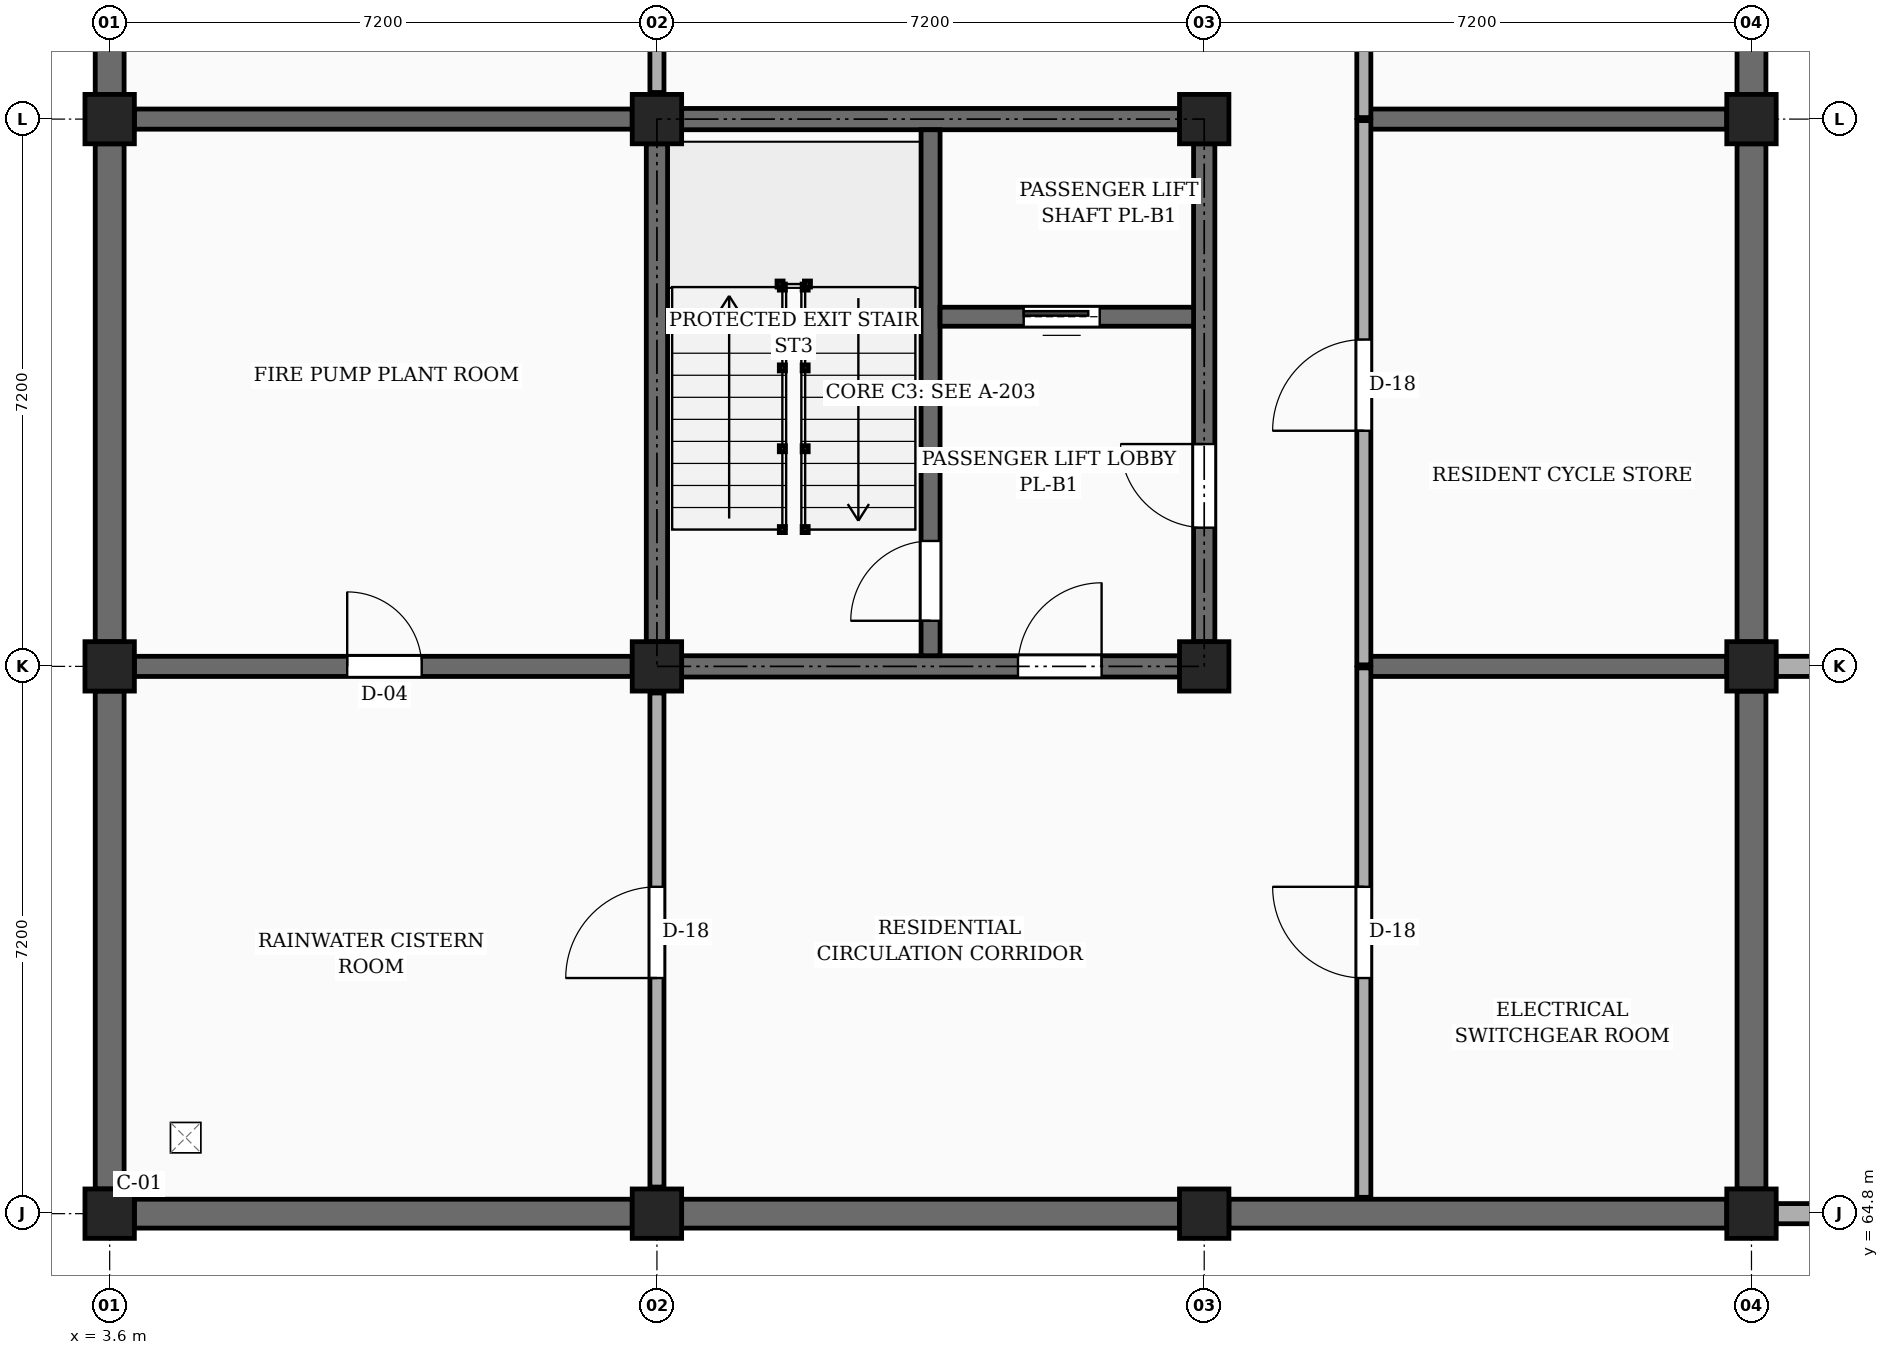
"""IFC4 building model, lengths in metres.
Left out: names, types, materials, properties, quantities, classifications, styles, units other than length and angle.
Written with IfcOpenShell. Run it as: python <this file> out.ifc"""

import sys

from ifc_helpers import new_model, si_unit, direction, frame, frame_2d, origin, origin_2d, place, context, subcontext, project, spatial, rectangle, extrude, element, fill, save


model = new_model("IFC4")
c1 = context("Model", 3, precision=1e-05, world=origin(), true_north=direction((0.0, 1.0)))
c2 = subcontext(c1, "Body", "Model", "MODEL_VIEW")
j1 = project(units=[si_unit("LENGTHUNIT", "METRE"), si_unit("PLANEANGLEUNIT", "RADIAN")], contexts=[c1])
p1 = place(None, origin())
s1 = spatial("IfcSite", under=j1, at=p1, CompositionType="ELEMENT")
p2 = place(p1, origin())
s2 = spatial("IfcBuilding", under=s1, at=p2, CompositionType="ELEMENT")
p3 = place(p2, frame((0.0, 0.0, -4.2)))
s3 = spatial("IfcBuildingStorey", under=s2, at=p3, CompositionType="ELEMENT", Elevation=-4.2)
p4 = place(p3, frame((25.525, 64.8, 0.0), z_axis=(0.0, 0.0, 1.0), x_axis=(1.0, 0.0, 0.0)))
e1 = element("IfcWall", 1, at=p4, inside=s3, PredefinedType="SOLIDWALL", context=c2, shape_type="SweptSolid", body=[
    extrude(rectangle(XDim=1.865, YDim=0.265, at=frame_2d((0.933, 0.0))), origin(), (0.0, 0.0, 1.0), 4.12),
])
p5 = place(p3, frame((27.39, 72.0, 0.0), z_axis=(0.0, 0.0, 1.0), x_axis=(-1.0, 0.0, 0.0)))
e2 = element("IfcWall", 2, at=p5, inside=s3, PredefinedType="SOLIDWALL", context=c2, shape_type="SweptSolid", body=[
    extrude(rectangle(XDim=1.865, YDim=0.265, at=frame_2d((0.933, 0.0))), origin(), (0.0, 0.0, 1.0), 3.35),
])
for number, where, z_axis, x_axis in (
    (3, (3.6, 64.8, 0.0), (0.0, 0.0, 1.0), (1.0, 0.0, 0.0)),
    (4, (3.6, 72.0, 0.0), (0.0, 0.0, 1.0), (1.0, 0.0, 0.0)),
    (5, (3.6, 79.2, 0.0), (0.0, 0.0, 1.0), (1.0, 0.0, 0.0)),
    (6, (10.8, 64.8, 0.0), (0.0, 0.0, 1.0), (1.0, 0.0, 0.0)),
    (7, (10.8, 72.0, 0.0), (0.0, 0.0, 1.0), (1.0, 0.0, 0.0)),
    (8, (10.8, 79.2, 0.0), (0.0, 0.0, 1.0), (1.0, 0.0, 0.0)),
    (9, (18.0, 64.8, 0.0), (0.0, 0.0, 1.0), (1.0, 0.0, 0.0)),
    (10, (18.0, 72.0, 0.0), (0.0, 0.0, 1.0), (1.0, 0.0, 0.0)),
    (11, (18.0, 79.2, 0.0), (0.0, 0.0, 1.0), (1.0, 0.0, 0.0)),
    (12, (25.2, 64.8, 0.0), (0.0, 0.0, 1.0), (1.0, 0.0, 0.0)),
    (13, (25.2, 72.0, 0.0), (0.0, 0.0, 1.0), (1.0, 0.0, 0.0)),
    (14, (25.2, 79.2, 0.0), (0.0, 0.0, 1.0), (1.0, 0.0, 0.0)),
):
    element("IfcColumn", number, at=place(p3, frame(where, z_axis=z_axis, x_axis=x_axis)), inside=s3, PredefinedType="COLUMN", context=c2, shape_type="SweptSolid", body=[
        extrude(rectangle(XDim=0.65, YDim=0.65, at=origin_2d()), origin(), (0.0, 0.0, 1.0), 4.2),
    ])
for number, where, z_axis, x_axis in (
    (15, (3.925, 64.8, 0.0), (0.0, 0.0, 1.0), (1.0, 0.0, 0.0)),
    (16, (11.125, 64.8, 0.0), (0.0, 0.0, 1.0), (1.0, 0.0, 0.0)),
    (17, (18.325, 64.8, 0.0), (0.0, 0.0, 1.0), (1.0, 0.0, 0.0)),
    (18, (25.2, 65.125, 0.0), (0.0, 0.0, 1.0), (0.0, 1.0, 0.0)),
    (19, (3.6, 71.675, 0.0), (0.0, 0.0, 1.0), (0.0, -1.0, 0.0)),
    (20, (25.2, 72.325, 0.0), (0.0, 0.0, 1.0), (0.0, 1.0, 0.0)),
    (21, (3.6, 78.875, 0.0), (0.0, 0.0, 1.0), (0.0, -1.0, 0.0)),
    (22, (25.2, 79.525, 0.0), (0.0, 0.0, 1.0), (0.0, 1.0, 0.0)),
    (23, (3.6, 86.075, 0.0), (0.0, 0.0, 1.0), (0.0, -1.0, 0.0)),
):
    element("IfcWall", number, at=place(p3, frame(where, z_axis=z_axis, x_axis=x_axis)), inside=s3, PredefinedType="USERDEFINED", context=c2, shape_type="SweptSolid", body=[
        extrude(rectangle(XDim=6.55, YDim=0.38, at=frame_2d((3.275, 0.0))), origin(), (0.0, 0.0, 1.0), 3.03),
    ])
p6 = place(p3, frame((3.925, 72.0, 0.0), z_axis=(0.0, 0.0, 1.0), x_axis=(1.0, 0.0, 0.0)))
e24 = element("IfcWall", 24, at=p6, inside=s3, PredefinedType="SOLIDWALL", context=c2, shape_type="SweptSolid", body=[
    extrude(rectangle(XDim=6.55, YDim=0.265, at=frame_2d((3.275, 0.0))), origin(), (0.0, 0.0, 1.0), 3.18),
])
p7 = place(p6, frame((2.8, 0.0, 0.0)))
e25 = element("IfcOpeningElement", 25, at=p7, cuts=e24, PredefinedType="OPENING", context=c2, shape_type="SweptSolid", body=[
    extrude(rectangle(XDim=0.98, YDim=2.12, at=frame_2d((0.49, 1.06))), frame((0.0, 0.143, 0.0), z_axis=(0.0, -1.0, 0.0), x_axis=(1.0, 0.0, 0.0)), (0.0, 0.0, 1.0), 0.285),
])
p8 = place(p3, frame((20.1, 72.0, 0.0), z_axis=(0.0, 0.0, 1.0), x_axis=(1.0, 0.0, 0.0)))
e26 = element("IfcWall", 26, at=p8, inside=s3, PredefinedType="SOLIDWALL", context=c2, shape_type="SweptSolid", body=[
    extrude(rectangle(XDim=4.775, YDim=0.265, at=frame_2d((2.387, 0.0))), origin(), (0.0, 0.0, 1.0), 3.18),
])
p9 = place(p3, frame((3.925, 79.2, 0.0), z_axis=(0.0, 0.0, 1.0), x_axis=(1.0, 0.0, 0.0)))
e27 = element("IfcWall", 27, at=p9, inside=s3, PredefinedType="SOLIDWALL", context=c2, shape_type="SweptSolid", body=[
    extrude(rectangle(XDim=6.55, YDim=0.265, at=frame_2d((3.275, 0.0))), origin(), (0.0, 0.0, 1.0), 3.18),
])
p10 = place(p3, frame((20.1, 79.2, 0.0), z_axis=(0.0, 0.0, 1.0), x_axis=(1.0, 0.0, 0.0)))
e28 = element("IfcWall", 28, at=p10, inside=s3, PredefinedType="SOLIDWALL", context=c2, shape_type="SweptSolid", body=[
    extrude(rectangle(XDim=4.775, YDim=0.265, at=frame_2d((2.387, 0.0))), origin(), (0.0, 0.0, 1.0), 3.18),
])
for number, where, z_axis, x_axis in (
    (29, (10.8, 72.325, 0.0), (0.0, 0.0, 1.0), (0.0, 1.0, 0.0)),
    (30, (11.125, 79.2, 0.0), (0.0, 0.0, 1.0), (1.0, 0.0, 0.0)),
):
    element("IfcWall", number, at=place(p3, frame(where, z_axis=z_axis, x_axis=x_axis)), inside=s3, PredefinedType="SHEAR", context=c2, shape_type="SweptSolid", body=[
        extrude(rectangle(XDim=6.55, YDim=0.28, at=frame_2d((3.275, 0.0))), origin(), (0.0, 0.0, 1.0), 3.88),
    ])
p11 = place(p3, frame((18.0, 72.325, 0.0), z_axis=(0.0, 0.0, 1.0), x_axis=(0.0, 1.0, 0.0)))
e31 = element("IfcWall", 31, at=p11, inside=s3, PredefinedType="SHEAR", context=c2, shape_type="SweptSolid", body=[
    extrude(rectangle(XDim=6.55, YDim=0.28, at=frame_2d((3.275, 0.0))), origin(), (0.0, 0.0, 1.0), 3.88),
])
p12 = place(p11, frame((1.5, 0.0, 0.0)))
e32 = element("IfcOpeningElement", 32, at=p12, cuts=e31, PredefinedType="OPENING", context=c2, shape_type="SweptSolid", body=[
    extrude(rectangle(XDim=1.1, YDim=2.15, at=frame_2d((0.55, 1.075))), frame((0.0, 0.15, 0.0), z_axis=(0.0, -1.0, 0.0), x_axis=(1.0, 0.0, 0.0)), (0.0, 0.0, 1.0), 0.3),
])
p13 = place(p3, frame((11.125, 72.0, 0.0), z_axis=(0.0, 0.0, 1.0), x_axis=(1.0, 0.0, 0.0)))
e33 = element("IfcWall", 33, at=p13, inside=s3, PredefinedType="SHEAR", context=c2, shape_type="SweptSolid", body=[
    extrude(rectangle(XDim=6.55, YDim=0.28, at=frame_2d((3.275, 0.0))), origin(), (0.0, 0.0, 1.0), 3.88),
])
p14 = place(p13, frame((4.425, 0.0, 0.0)))
e34 = element("IfcOpeningElement", 34, at=p14, cuts=e33, PredefinedType="OPENING", context=c2, shape_type="SweptSolid", body=[
    extrude(rectangle(XDim=1.1, YDim=2.15, at=frame_2d((0.55, 1.075))), frame((0.0, 0.15, 0.0), z_axis=(0.0, -1.0, 0.0), x_axis=(1.0, 0.0, 0.0)), (0.0, 0.0, 1.0), 0.3),
])
p15 = place(p3, frame((14.4, 72.14, 0.0), z_axis=(0.0, 0.0, 1.0), x_axis=(0.0, 1.0, 0.0)))
e35 = element("IfcWall", 35, at=p15, inside=s3, PredefinedType="SHEAR", context=c2, shape_type="SweptSolid", body=[
    extrude(rectangle(XDim=6.92, YDim=0.25, at=frame_2d((3.46, 0.0))), origin(), (0.0, 0.0, 1.0), 3.88),
])
p16 = place(p15, frame((0.46, 0.0, 0.0)))
e36 = element("IfcOpeningElement", 36, at=p16, cuts=e35, PredefinedType="OPENING", context=c2, shape_type="SweptSolid", body=[
    extrude(rectangle(XDim=1.05, YDim=2.15, at=frame_2d((0.525, 1.075))), frame((0.0, 0.135, 0.0), z_axis=(0.0, -1.0, 0.0), x_axis=(1.0, 0.0, 0.0)), (0.0, 0.0, 1.0), 0.27),
])
p17 = place(p3, frame((14.525, 76.6, 0.0), z_axis=(0.0, 0.0, 1.0), x_axis=(1.0, 0.0, 0.0)))
e37 = element("IfcWall", 37, at=p17, inside=s3, PredefinedType="SHEAR", context=c2, shape_type="SweptSolid", body=[
    extrude(rectangle(XDim=3.335, YDim=0.25, at=frame_2d((1.667, 0.0))), origin(), (0.0, 0.0, 1.0), 3.88),
])
p18 = place(p17, frame((1.1, 0.0, 0.0)))
e38 = element("IfcOpeningElement", 38, at=p18, cuts=e37, PredefinedType="OPENING", context=c2, shape_type="SweptSolid", body=[
    extrude(rectangle(XDim=1.0, YDim=2.2, at=frame_2d((0.5, 1.1))), frame((0.0, 0.135, 0.0), z_axis=(0.0, -1.0, 0.0), x_axis=(1.0, 0.0, 0.0)), (0.0, 0.0, 1.0), 0.27),
])
p19 = place(p3, frame((20.1, 65.015, 0.0), z_axis=(0.0, 0.0, 1.0), x_axis=(0.0, 1.0, 0.0)))
e39 = element("IfcWall", 39, at=p19, inside=s3, PredefinedType="PARTITIONING", context=c2, shape_type="SweptSolid", body=[
    extrude(rectangle(XDim=6.965, YDim=0.185, at=frame_2d((3.482, 0.0))), origin(), (0.0, 0.0, 1.0), 3.315),
])
p20 = place(p19, frame((2.885, 0.0, 0.0)))
e40 = element("IfcOpeningElement", 40, at=p20, cuts=e39, PredefinedType="OPENING", context=c2, shape_type="SweptSolid", body=[
    extrude(rectangle(XDim=1.2, YDim=2.2, at=frame_2d((0.6, 1.1))), frame((0.0, 0.103, 0.0), z_axis=(0.0, -1.0, 0.0), x_axis=(1.0, 0.0, 0.0)), (0.0, 0.0, 1.0), 0.205),
])
p21 = place(p3, frame((20.1, 72.02, 0.0), z_axis=(0.0, 0.0, 1.0), x_axis=(0.0, 1.0, 0.0)))
e41 = element("IfcWall", 41, at=p21, inside=s3, PredefinedType="PARTITIONING", context=c2, shape_type="SweptSolid", body=[
    extrude(rectangle(XDim=7.16, YDim=0.185, at=frame_2d((3.58, 0.0))), origin(), (0.0, 0.0, 1.0), 3.315),
])
p22 = place(p21, frame((3.08, 0.0, 0.0)))
e42 = element("IfcOpeningElement", 42, at=p22, cuts=e41, PredefinedType="OPENING", context=c2, shape_type="SweptSolid", body=[
    extrude(rectangle(XDim=1.2, YDim=2.2, at=frame_2d((0.6, 1.1))), frame((0.0, 0.103, 0.0), z_axis=(0.0, -1.0, 0.0), x_axis=(1.0, 0.0, 0.0)), (0.0, 0.0, 1.0), 0.205),
])
p23 = place(p3, frame((20.1, 79.22, 0.0), z_axis=(0.0, 0.0, 1.0), x_axis=(0.0, 1.0, 0.0)))
e43 = element("IfcWall", 43, at=p23, inside=s3, PredefinedType="PARTITIONING", context=c2, shape_type="SweptSolid", body=[
    extrude(rectangle(XDim=7.16, YDim=0.185, at=frame_2d((3.58, 0.0))), origin(), (0.0, 0.0, 1.0), 3.315),
])
p24 = place(p23, frame((3.08, 0.0, 0.0)))
e44 = element("IfcOpeningElement", 44, at=p24, cuts=e43, PredefinedType="OPENING", context=c2, shape_type="SweptSolid", body=[
    extrude(rectangle(XDim=1.2, YDim=2.2, at=frame_2d((0.6, 1.1))), frame((0.0, 0.103, 0.0), z_axis=(0.0, -1.0, 0.0), x_axis=(1.0, 0.0, 0.0)), (0.0, 0.0, 1.0), 0.205),
])
p25 = place(p3, frame((10.8, 65.15, 0.0), z_axis=(0.0, 0.0, 1.0), x_axis=(0.0, 1.0, 0.0)))
e45 = element("IfcWall", 45, at=p25, inside=s3, PredefinedType="PARTITIONING", context=c2, shape_type="SweptSolid", body=[
    extrude(rectangle(XDim=6.5, YDim=0.185, at=frame_2d((3.25, 0.0))), origin(), (0.0, 0.0, 1.0), 3.08),
])
p26 = place(p25, frame((2.75, 0.0, 0.0)))
e46 = element("IfcOpeningElement", 46, at=p26, cuts=e45, PredefinedType="OPENING", context=c2, shape_type="SweptSolid", body=[
    extrude(rectangle(XDim=1.2, YDim=2.2, at=frame_2d((0.6, 1.1))), frame((0.0, 0.103, 0.0), z_axis=(0.0, -1.0, 0.0), x_axis=(1.0, 0.0, 0.0)), (0.0, 0.0, 1.0), 0.205),
])
p27 = place(p3, frame((10.8, 79.55, 0.0), z_axis=(0.0, 0.0, 1.0), x_axis=(0.0, 1.0, 0.0)))
e47 = element("IfcWall", 47, at=p27, inside=s3, PredefinedType="PARTITIONING", context=c2, shape_type="SweptSolid", body=[
    extrude(rectangle(XDim=6.5, YDim=0.185, at=frame_2d((3.25, 0.0))), origin(), (0.0, 0.0, 1.0), 3.08),
])
p28 = place(p27, frame((2.75, 0.0, 0.0)))
e48 = element("IfcOpeningElement", 48, at=p28, cuts=e47, PredefinedType="OPENING", context=c2, shape_type="SweptSolid", body=[
    extrude(rectangle(XDim=1.2, YDim=2.2, at=frame_2d((0.6, 1.1))), frame((0.0, 0.103, 0.0), z_axis=(0.0, -1.0, 0.0), x_axis=(1.0, 0.0, 0.0)), (0.0, 0.0, 1.0), 0.205),
])
p29 = place(p12, frame((1.1, 0.0, 0.0), z_axis=(0.0, 0.0, 1.0), x_axis=(-1.0, 0.0, 0.0)))
e49 = element("IfcDoor", 49, at=p29, inside=s3, OperationType="SINGLE_SWING_RIGHT", PredefinedType="DOOR", context=c2, shape_type="SweptSolid", body=[
    extrude(rectangle(XDim=1.1, YDim=2.15, at=frame_2d((0.55, 1.075))), frame((0.0, 0.025, 0.0), z_axis=(0.0, -1.0, 0.0), x_axis=(1.0, 0.0, 0.0)), (0.0, 0.0, 1.0), 0.05),
])
fill(e32, e49)
p30 = place(p14, frame((1.1, 0.0, 0.0), z_axis=(0.0, 0.0, 1.0), x_axis=(-1.0, 0.0, 0.0)))
e50 = element("IfcDoor", 50, at=p30, inside=s3, OperationType="SINGLE_SWING_RIGHT", PredefinedType="DOOR", context=c2, shape_type="SweptSolid", body=[
    extrude(rectangle(XDim=1.1, YDim=2.15, at=frame_2d((0.55, 1.075))), frame((0.0, 0.025, 0.0), z_axis=(0.0, -1.0, 0.0), x_axis=(1.0, 0.0, 0.0)), (0.0, 0.0, 1.0), 0.05),
])
fill(e34, e50)
p31 = place(p16, origin())
e51 = element("IfcDoor", 51, at=p31, inside=s3, OperationType="SINGLE_SWING_LEFT", PredefinedType="DOOR", context=c2, shape_type="SweptSolid", body=[
    extrude(rectangle(XDim=1.05, YDim=2.15, at=frame_2d((0.525, 1.075))), frame((0.0, 0.025, 0.0), z_axis=(0.0, -1.0, 0.0), x_axis=(1.0, 0.0, 0.0)), (0.0, 0.0, 1.0), 0.05),
])
fill(e36, e51)
p32 = place(p18, origin())
e52 = element("IfcDoor", 52, at=p32, inside=s3, OperationType="SLIDING_TO_LEFT", PredefinedType="DOOR", context=c2, shape_type="SweptSolid", body=[
    extrude(rectangle(XDim=1.0, YDim=2.2, at=frame_2d((0.5, 1.1))), frame((0.0, 0.025, 0.0), z_axis=(0.0, -1.0, 0.0), x_axis=(1.0, 0.0, 0.0)), (0.0, 0.0, 1.0), 0.05),
])
fill(e38, e52)
p33 = place(p20, origin())
e53 = element("IfcDoor", 53, at=p33, inside=s3, OperationType="SINGLE_SWING_RIGHT", PredefinedType="DOOR", context=c2, shape_type="SweptSolid", body=[
    extrude(rectangle(XDim=1.2, YDim=2.2, at=frame_2d((0.6, 1.1))), frame((0.0, 0.025, 0.0), z_axis=(0.0, -1.0, 0.0), x_axis=(1.0, 0.0, 0.0)), (0.0, 0.0, 1.0), 0.05),
])
fill(e40, e53)
p34 = place(p22, origin())
e54 = element("IfcDoor", 54, at=p34, inside=s3, OperationType="SINGLE_SWING_LEFT", PredefinedType="DOOR", context=c2, shape_type="SweptSolid", body=[
    extrude(rectangle(XDim=1.2, YDim=2.2, at=frame_2d((0.6, 1.1))), frame((0.0, 0.025, 0.0), z_axis=(0.0, -1.0, 0.0), x_axis=(1.0, 0.0, 0.0)), (0.0, 0.0, 1.0), 0.05),
])
fill(e42, e54)
p35 = place(p26, origin())
e55 = element("IfcDoor", 55, at=p35, inside=s3, OperationType="SINGLE_SWING_LEFT", PredefinedType="DOOR", context=c2, shape_type="SweptSolid", body=[
    extrude(rectangle(XDim=1.2, YDim=2.2, at=frame_2d((0.6, 1.1))), frame((0.0, 0.025, 0.0), z_axis=(0.0, -1.0, 0.0), x_axis=(1.0, 0.0, 0.0)), (0.0, 0.0, 1.0), 0.05),
])
fill(e46, e55)
p36 = place(p7, origin())
e56 = element("IfcDoor", 56, at=p36, inside=s3, OperationType="SINGLE_SWING_LEFT", PredefinedType="DOOR", context=c2, shape_type="SweptSolid", body=[
    extrude(rectangle(XDim=0.98, YDim=2.12, at=frame_2d((0.49, 1.06))), frame((0.0, 0.025, 0.0), z_axis=(0.0, -1.0, 0.0), x_axis=(1.0, 0.0, 0.0)), (0.0, 0.0, 1.0), 0.05),
])
fill(e25, e56)
save(model, sys.argv[1])
